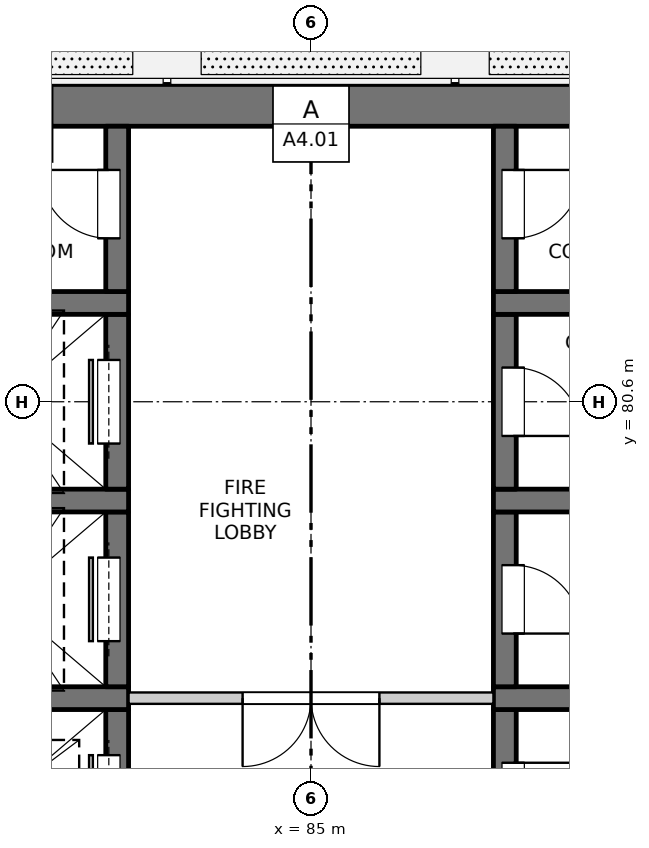
"""IFC4 building model, lengths in metres.
Left out: names, types, materials, properties, quantities, classifications, styles, units other than length and angle.
Written with IfcOpenShell. Run it as: python <this file> out.ifc"""

import sys

from ifc_helpers import new_model, si_unit, direction, frame, frame_2d, origin, place, context, subcontext, project, spatial, rectangle, extrude, element, fill, save


model = new_model("IFC4")
c1 = context("Model", 3, precision=1e-05, world=origin(), true_north=direction((0.0, 1.0)))
c2 = subcontext(c1, "Body", "Model", "MODEL_VIEW")
j1 = project(units=[si_unit("LENGTHUNIT", "METRE"), si_unit("PLANEANGLEUNIT", "RADIAN")], contexts=[c1])
p1 = place(None, origin())
s1 = spatial("IfcSite", under=j1, at=p1, CompositionType="ELEMENT")
p2 = place(p1, origin())
s2 = spatial("IfcBuilding", under=s1, at=p2, CompositionType="ELEMENT")
p3 = place(p2, frame((0.0, 0.0, 99.9)))
s3 = spatial("IfcBuildingStorey", under=s2, at=p3, CompositionType="ELEMENT", Elevation=99.9)
p4 = place(p3, frame((75.525, 84.5, -0.3), z_axis=(0.0, 0.0, 1.0), x_axis=(1.0, 0.0, 0.0)))
e1 = element("IfcWall", 1, at=p4, inside=s3, PredefinedType="SOLIDWALL", context=c2, shape_type="SweptSolid", body=[
    extrude(rectangle(XDim=18.95, YDim=0.55, at=frame_2d((9.475, 0.0))), origin(), (0.0, 0.0, 1.0), 3.45),
])
p5 = place(p3, frame((82.45, 74.25, -0.3), z_axis=(0.0, 0.0, 1.0), x_axis=(0.0, 1.0, 0.0)))
e2 = element("IfcWall", 2, at=p5, inside=s3, PredefinedType="SOLIDWALL", context=c2, shape_type="SweptSolid", body=[
    extrude(rectangle(XDim=2.3, YDim=0.3, at=frame_2d((1.15, 0.0))), origin(), (0.0, 0.0, 1.0), 3.45),
])
p6 = place(p5, frame((0.6, 0.0, 0.3)))
e3 = element("IfcOpeningElement", 3, at=p6, cuts=e2, PredefinedType="OPENING", context=c2, shape_type="SweptSolid", body=[
    extrude(rectangle(XDim=1.1, YDim=2.1, at=frame_2d((0.55, 1.05))), frame((0.0, 0.16, 0.0), z_axis=(0.0, -1.0, 0.0), x_axis=(1.0, 0.0, 0.0)), (0.0, 0.0, 1.0), 0.32),
])
p7 = place(p3, frame((79.6, 76.7, -0.3), z_axis=(0.0, 0.0, 1.0), x_axis=(1.0, 0.0, 0.0)))
e4 = element("IfcWall", 4, at=p7, inside=s3, PredefinedType="SOLIDWALL", context=c2, shape_type="SweptSolid", body=[
    extrude(rectangle(XDim=3.0, YDim=0.3, at=frame_2d((1.5, 0.0))), origin(), (0.0, 0.0, 1.0), 3.45),
])
p8 = place(p3, frame((82.45, 76.85, -0.3), z_axis=(0.0, 0.0, 1.0), x_axis=(0.0, 1.0, 0.0)))
e5 = element("IfcWall", 5, at=p8, inside=s3, PredefinedType="SOLIDWALL", context=c2, shape_type="SweptSolid", body=[
    extrude(rectangle(XDim=2.3, YDim=0.3, at=frame_2d((1.15, 0.0))), origin(), (0.0, 0.0, 1.0), 3.45),
])
p9 = place(p8, frame((0.6, 0.0, 0.3)))
e6 = element("IfcOpeningElement", 6, at=p9, cuts=e5, PredefinedType="OPENING", context=c2, shape_type="SweptSolid", body=[
    extrude(rectangle(XDim=1.1, YDim=2.1, at=frame_2d((0.55, 1.05))), frame((0.0, 0.16, 0.0), z_axis=(0.0, -1.0, 0.0), x_axis=(1.0, 0.0, 0.0)), (0.0, 0.0, 1.0), 0.32),
])
p10 = place(p3, frame((79.6, 79.3, -0.3), z_axis=(0.0, 0.0, 1.0), x_axis=(1.0, 0.0, 0.0)))
e7 = element("IfcWall", 7, at=p10, inside=s3, PredefinedType="SOLIDWALL", context=c2, shape_type="SweptSolid", body=[
    extrude(rectangle(XDim=3.0, YDim=0.3, at=frame_2d((1.5, 0.0))), origin(), (0.0, 0.0, 1.0), 3.45),
])
p11 = place(p3, frame((82.45, 79.45, -0.3), z_axis=(0.0, 0.0, 1.0), x_axis=(0.0, 1.0, 0.0)))
e8 = element("IfcWall", 8, at=p11, inside=s3, PredefinedType="SOLIDWALL", context=c2, shape_type="SweptSolid", body=[
    extrude(rectangle(XDim=2.3, YDim=0.3, at=frame_2d((1.15, 0.0))), origin(), (0.0, 0.0, 1.0), 3.45),
])
p12 = place(p11, frame((0.6, 0.0, 0.3)))
e9 = element("IfcOpeningElement", 9, at=p12, cuts=e8, PredefinedType="OPENING", context=c2, shape_type="SweptSolid", body=[
    extrude(rectangle(XDim=1.1, YDim=2.1, at=frame_2d((0.55, 1.05))), frame((0.0, 0.16, 0.0), z_axis=(0.0, -1.0, 0.0), x_axis=(1.0, 0.0, 0.0)), (0.0, 0.0, 1.0), 0.32),
])
p13 = place(p3, frame((79.6, 81.9, -0.3), z_axis=(0.0, 0.0, 1.0), x_axis=(1.0, 0.0, 0.0)))
e10 = element("IfcWall", 10, at=p13, inside=s3, PredefinedType="SOLIDWALL", context=c2, shape_type="SweptSolid", body=[
    extrude(rectangle(XDim=3.0, YDim=0.3, at=frame_2d((1.5, 0.0))), origin(), (0.0, 0.0, 1.0), 3.45),
])
p14 = place(p3, frame((82.45, 82.05, -0.3), z_axis=(0.0, 0.0, 1.0), x_axis=(0.0, 1.0, 0.0)))
e11 = element("IfcWall", 11, at=p14, inside=s3, PredefinedType="SOLIDWALL", context=c2, shape_type="SweptSolid", body=[
    extrude(rectangle(XDim=2.175, YDim=0.3, at=frame_2d((1.087, 0.0))), origin(), (0.0, 0.0, 1.0), 3.45),
])
p15 = place(p14, frame((0.7, 0.0, 0.3)))
e12 = element("IfcOpeningElement", 12, at=p15, cuts=e11, PredefinedType="OPENING", context=c2, shape_type="SweptSolid", body=[
    extrude(rectangle(XDim=0.9, YDim=2.1, at=frame_2d((0.45, 1.05))), frame((0.0, 0.16, 0.0), z_axis=(0.0, -1.0, 0.0), x_axis=(1.0, 0.0, 0.0)), (0.0, 0.0, 1.0), 0.32),
])
p16 = place(p3, frame((87.55, 74.25, -0.3), z_axis=(0.0, 0.0, 1.0), x_axis=(0.0, 1.0, 0.0)))
e13 = element("IfcWall", 13, at=p16, inside=s3, PredefinedType="SOLIDWALL", context=c2, shape_type="SweptSolid", body=[
    extrude(rectangle(XDim=2.3, YDim=0.3, at=frame_2d((1.15, 0.0))), origin(), (0.0, 0.0, 1.0), 3.45),
])
p17 = place(p16, frame((0.7, 0.0, 0.3)))
e14 = element("IfcOpeningElement", 14, at=p17, cuts=e13, PredefinedType="OPENING", context=c2, shape_type="SweptSolid", body=[
    extrude(rectangle(XDim=0.9, YDim=2.1, at=frame_2d((0.45, 1.05))), frame((0.0, 0.16, 0.0), z_axis=(0.0, -1.0, 0.0), x_axis=(1.0, 0.0, 0.0)), (0.0, 0.0, 1.0), 0.32),
])
p18 = place(p3, frame((87.4, 76.7, -0.3), z_axis=(0.0, 0.0, 1.0), x_axis=(1.0, 0.0, 0.0)))
e15 = element("IfcWall", 15, at=p18, inside=s3, PredefinedType="SOLIDWALL", context=c2, shape_type="SweptSolid", body=[
    extrude(rectangle(XDim=3.0, YDim=0.3, at=frame_2d((1.5, 0.0))), origin(), (0.0, 0.0, 1.0), 3.45),
])
p19 = place(p3, frame((87.55, 76.85, -0.3), z_axis=(0.0, 0.0, 1.0), x_axis=(0.0, 1.0, 0.0)))
e16 = element("IfcWall", 16, at=p19, inside=s3, PredefinedType="SOLIDWALL", context=c2, shape_type="SweptSolid", body=[
    extrude(rectangle(XDim=2.3, YDim=0.3, at=frame_2d((1.15, 0.0))), origin(), (0.0, 0.0, 1.0), 3.45),
])
p20 = place(p19, frame((0.7, 0.0, 0.3)))
e17 = element("IfcOpeningElement", 17, at=p20, cuts=e16, PredefinedType="OPENING", context=c2, shape_type="SweptSolid", body=[
    extrude(rectangle(XDim=0.9, YDim=2.1, at=frame_2d((0.45, 1.05))), frame((0.0, 0.16, 0.0), z_axis=(0.0, -1.0, 0.0), x_axis=(1.0, 0.0, 0.0)), (0.0, 0.0, 1.0), 0.32),
])
p21 = place(p3, frame((87.4, 79.3, -0.3), z_axis=(0.0, 0.0, 1.0), x_axis=(1.0, 0.0, 0.0)))
e18 = element("IfcWall", 18, at=p21, inside=s3, PredefinedType="SOLIDWALL", context=c2, shape_type="SweptSolid", body=[
    extrude(rectangle(XDim=3.0, YDim=0.3, at=frame_2d((1.5, 0.0))), origin(), (0.0, 0.0, 1.0), 3.45),
])
p22 = place(p3, frame((87.55, 79.45, -0.3), z_axis=(0.0, 0.0, 1.0), x_axis=(0.0, 1.0, 0.0)))
e19 = element("IfcWall", 19, at=p22, inside=s3, PredefinedType="SOLIDWALL", context=c2, shape_type="SweptSolid", body=[
    extrude(rectangle(XDim=2.3, YDim=0.3, at=frame_2d((1.15, 0.0))), origin(), (0.0, 0.0, 1.0), 3.45),
])
p23 = place(p22, frame((0.7, 0.0, 0.3)))
e20 = element("IfcOpeningElement", 20, at=p23, cuts=e19, PredefinedType="OPENING", context=c2, shape_type="SweptSolid", body=[
    extrude(rectangle(XDim=0.9, YDim=2.1, at=frame_2d((0.45, 1.05))), frame((0.0, 0.16, 0.0), z_axis=(0.0, -1.0, 0.0), x_axis=(1.0, 0.0, 0.0)), (0.0, 0.0, 1.0), 0.32),
])
p24 = place(p3, frame((87.4, 81.9, -0.3), z_axis=(0.0, 0.0, 1.0), x_axis=(1.0, 0.0, 0.0)))
e21 = element("IfcWall", 21, at=p24, inside=s3, PredefinedType="SOLIDWALL", context=c2, shape_type="SweptSolid", body=[
    extrude(rectangle(XDim=3.0, YDim=0.3, at=frame_2d((1.5, 0.0))), origin(), (0.0, 0.0, 1.0), 3.45),
])
p25 = place(p3, frame((87.55, 82.05, -0.3), z_axis=(0.0, 0.0, 1.0), x_axis=(0.0, 1.0, 0.0)))
e22 = element("IfcWall", 22, at=p25, inside=s3, PredefinedType="SOLIDWALL", context=c2, shape_type="SweptSolid", body=[
    extrude(rectangle(XDim=2.175, YDim=0.3, at=frame_2d((1.087, 0.0))), origin(), (0.0, 0.0, 1.0), 3.45),
])
p26 = place(p25, frame((0.7, 0.0, 0.3)))
e23 = element("IfcOpeningElement", 23, at=p26, cuts=e22, PredefinedType="OPENING", context=c2, shape_type="SweptSolid", body=[
    extrude(rectangle(XDim=0.9, YDim=2.1, at=frame_2d((0.45, 1.05))), frame((0.0, 0.16, 0.0), z_axis=(0.0, -1.0, 0.0), x_axis=(1.0, 0.0, 0.0)), (0.0, 0.0, 1.0), 0.32),
])
p27 = place(p3, frame((82.6, 76.7, 0.0), z_axis=(0.0, 0.0, 1.0), x_axis=(1.0, 0.0, 0.0)))
e24 = element("IfcWall", 24, at=p27, inside=s3, PredefinedType="PARTITIONING", context=c2, shape_type="SweptSolid", body=[
    extrude(rectangle(XDim=4.8, YDim=0.15, at=frame_2d((2.4, 0.0))), origin(), (0.0, 0.0, 1.0), 3.15),
])
p28 = place(p27, frame((1.5, 0.0, 0.0)))
e25 = element("IfcOpeningElement", 25, at=p28, cuts=e24, PredefinedType="OPENING", context=c2, shape_type="SweptSolid", body=[
    extrude(rectangle(XDim=1.8, YDim=2.1, at=frame_2d((0.9, 1.05))), frame((0.0, 0.085, 0.0), z_axis=(0.0, -1.0, 0.0), x_axis=(1.0, 0.0, 0.0)), (0.0, 0.0, 1.0), 0.17),
])
p29 = place(p6, origin())
e26 = element("IfcDoor", 26, at=p29, inside=s3, OperationType="SLIDING_TO_LEFT", PredefinedType="DOOR", context=c2, shape_type="SweptSolid", body=[
    extrude(rectangle(XDim=1.1, YDim=2.1, at=frame_2d((0.55, 1.05))), frame((0.0, 0.135, 0.0), z_axis=(0.0, -1.0, 0.0), x_axis=(1.0, 0.0, 0.0)), (0.0, 0.0, 1.0), 0.05),
])
fill(e3, e26)
p30 = place(p17, origin())
e27 = element("IfcDoor", 27, at=p30, inside=s3, OperationType="SINGLE_SWING_LEFT", PredefinedType="DOOR", context=c2, shape_type="SweptSolid", body=[
    extrude(rectangle(XDim=0.9, YDim=2.1, at=frame_2d((0.45, 1.05))), frame((0.0, -0.085, 0.0), z_axis=(0.0, -1.0, 0.0), x_axis=(1.0, 0.0, 0.0)), (0.0, 0.0, 1.0), 0.05),
])
fill(e14, e27)
p31 = place(p28, origin())
e28 = element("IfcDoor", 28, at=p31, inside=s3, OperationType="DOUBLE_DOOR_SINGLE_SWING", PredefinedType="DOOR", context=c2, shape_type="SweptSolid", body=[
    extrude(rectangle(XDim=1.8, YDim=2.1, at=frame_2d((0.9, 1.05))), frame((0.0, 0.025, 0.0), z_axis=(0.0, -1.0, 0.0), x_axis=(1.0, 0.0, 0.0)), (0.0, 0.0, 1.0), 0.05),
])
fill(e25, e28)
p32 = place(p9, origin())
e29 = element("IfcDoor", 29, at=p32, inside=s3, OperationType="SLIDING_TO_LEFT", PredefinedType="DOOR", context=c2, shape_type="SweptSolid", body=[
    extrude(rectangle(XDim=1.1, YDim=2.1, at=frame_2d((0.55, 1.05))), frame((0.0, 0.135, 0.0), z_axis=(0.0, -1.0, 0.0), x_axis=(1.0, 0.0, 0.0)), (0.0, 0.0, 1.0), 0.05),
])
fill(e6, e29)
p33 = place(p20, origin())
e30 = element("IfcDoor", 30, at=p33, inside=s3, OperationType="SINGLE_SWING_RIGHT", PredefinedType="DOOR", context=c2, shape_type="SweptSolid", body=[
    extrude(rectangle(XDim=0.9, YDim=2.1, at=frame_2d((0.45, 1.05))), frame((0.0, -0.085, 0.0), z_axis=(0.0, -1.0, 0.0), x_axis=(1.0, 0.0, 0.0)), (0.0, 0.0, 1.0), 0.05),
])
fill(e17, e30)
p34 = place(p12, origin())
e31 = element("IfcDoor", 31, at=p34, inside=s3, OperationType="SLIDING_TO_LEFT", PredefinedType="DOOR", context=c2, shape_type="SweptSolid", body=[
    extrude(rectangle(XDim=1.1, YDim=2.1, at=frame_2d((0.55, 1.05))), frame((0.0, 0.135, 0.0), z_axis=(0.0, -1.0, 0.0), x_axis=(1.0, 0.0, 0.0)), (0.0, 0.0, 1.0), 0.05),
])
fill(e9, e31)
p35 = place(p23, origin())
e32 = element("IfcDoor", 32, at=p35, inside=s3, OperationType="SINGLE_SWING_RIGHT", PredefinedType="DOOR", context=c2, shape_type="SweptSolid", body=[
    extrude(rectangle(XDim=0.9, YDim=2.1, at=frame_2d((0.45, 1.05))), frame((0.0, -0.085, 0.0), z_axis=(0.0, -1.0, 0.0), x_axis=(1.0, 0.0, 0.0)), (0.0, 0.0, 1.0), 0.05),
])
fill(e20, e32)
p36 = place(p15, origin())
e33 = element("IfcDoor", 33, at=p36, inside=s3, OperationType="SINGLE_SWING_RIGHT", PredefinedType="DOOR", context=c2, shape_type="SweptSolid", body=[
    extrude(rectangle(XDim=0.9, YDim=2.1, at=frame_2d((0.45, 1.05))), frame((0.0, 0.135, 0.0), z_axis=(0.0, -1.0, 0.0), x_axis=(1.0, 0.0, 0.0)), (0.0, 0.0, 1.0), 0.05),
])
fill(e12, e33)
p37 = place(p26, origin())
e34 = element("IfcDoor", 34, at=p37, inside=s3, OperationType="SINGLE_SWING_LEFT", PredefinedType="DOOR", context=c2, shape_type="SweptSolid", body=[
    extrude(rectangle(XDim=0.9, YDim=2.1, at=frame_2d((0.45, 1.05))), frame((0.0, -0.085, 0.0), z_axis=(0.0, -1.0, 0.0), x_axis=(1.0, 0.0, 0.0)), (0.0, 0.0, 1.0), 0.05),
])
fill(e23, e34)
save(model, sys.argv[1])
